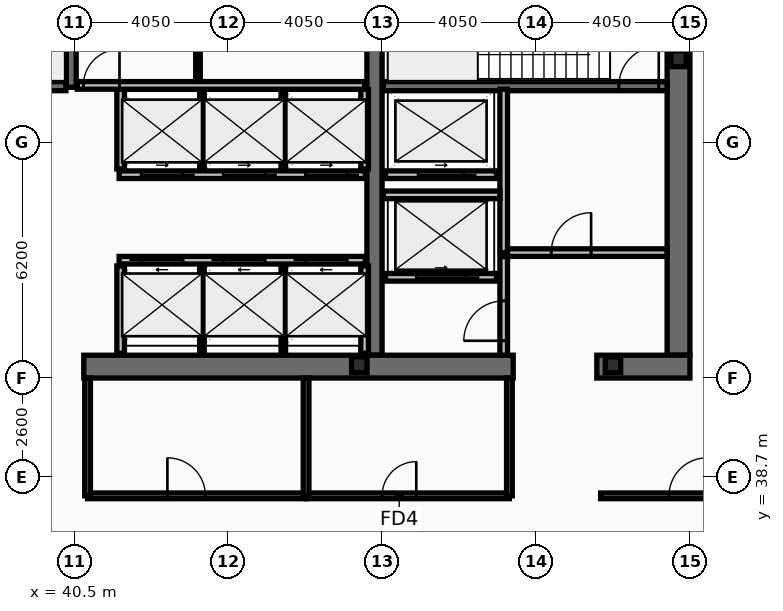
"""IFC4 building model, lengths in metres.
Left out: names, types, materials, properties, quantities, classifications, styles, units other than length and angle.
Written with IfcOpenShell. Run it as: python <this file> out.ifc"""

import sys

from ifc_helpers import new_model, si_unit, direction, frame, frame_2d, origin, origin_2d, place, context, subcontext, project, spatial, rectangle, i_section, extrude, element, fill, save


model = new_model("IFC4")
c1 = context("Model", 3, precision=1e-05, world=origin(), true_north=direction((0.0, 1.0)))
c2 = subcontext(c1, "Body", "Model", "MODEL_VIEW")
j1 = project(units=[si_unit("LENGTHUNIT", "METRE"), si_unit("PLANEANGLEUNIT", "RADIAN")], contexts=[c1])
p1 = place(None, origin())
s1 = spatial("IfcSite", under=j1, at=p1, CompositionType="ELEMENT")
p2 = place(p1, origin())
s2 = spatial("IfcBuilding", under=s1, at=p2, CompositionType="ELEMENT")
p3 = place(p2, frame((0.0, 0.0, 265.4)))
s3 = spatial("IfcBuildingStorey", under=s2, at=p3, CompositionType="ELEMENT", Elevation=265.4)
p4 = place(p3, frame((56.4, 53.1, 0.0), z_axis=(0.0, 0.0, 1.0), x_axis=(0.0, -1.0, 0.0)))
e1 = element("IfcWall", 1, at=p4, inside=s3, PredefinedType="SHEAR", context=c2, shape_type="SweptSolid", body=[
    extrude(rectangle(XDim=11.2, YDim=0.6, at=frame_2d((5.6, 0.0))), origin(), (0.0, 0.0, 1.0), 4.24),
])
p5 = place(p3, frame((48.4, 41.9, 0.0), z_axis=(0.0, 0.0, 1.0), x_axis=(0.0, 1.0, 0.0)))
e2 = element("IfcWall", 2, at=p5, inside=s3, PredefinedType="SHEAR", context=c2, shape_type="SweptSolid", body=[
    extrude(rectangle(XDim=11.2, YDim=0.4, at=frame_2d((5.6, 0.0))), origin(), (0.0, 0.0, 1.0), 4.24),
])
p6 = place(p3, frame((52.05, 41.6, 0.0), z_axis=(0.0, 0.0, 1.0), x_axis=(-1.0, 0.0, 0.0)))
e3 = element("IfcWall", 3, at=p6, inside=s3, PredefinedType="SHEAR", context=c2, shape_type="SweptSolid", body=[
    extrude(rectangle(XDim=11.3, YDim=0.6, at=frame_2d((5.65, 0.0))), origin(), (0.0, 0.0, 1.0), 4.24),
])
p7 = place(p3, frame((56.7, 41.6, 0.0), z_axis=(0.0, 0.0, 1.0), x_axis=(-1.0, 0.0, 0.0)))
e4 = element("IfcWall", 4, at=p7, inside=s3, PredefinedType="SHEAR", context=c2, shape_type="SweptSolid", body=[
    extrude(rectangle(XDim=2.45, YDim=0.6, at=frame_2d((1.225, 0.0))), origin(), (0.0, 0.0, 1.0), 4.24),
])
p8 = place(p3, frame((40.42, 48.95, 0.0), z_axis=(0.0, 0.0, 1.0), x_axis=(0.0, 1.0, 0.0)))
e5 = element("IfcWall", 5, at=p8, inside=s3, PredefinedType="SHEAR", context=c2, shape_type="SweptSolid", body=[
    extrude(rectangle(XDim=4.15, YDim=0.26, at=frame_2d((2.075, 0.0))), origin(), (0.0, 0.0, 1.0), 4.24),
])
p9 = place(p3, frame((48.63, 48.98, 0.0), z_axis=(0.0, 0.0, 1.0), x_axis=(1.0, 0.0, 0.0)))
e6 = element("IfcWall", 6, at=p9, inside=s3, PredefinedType="SHEAR", context=c2, shape_type="SweptSolid", body=[
    extrude(rectangle(XDim=7.47, YDim=0.24, at=frame_2d((3.735, 0.0))), origin(), (0.0, 0.0, 1.0), 4.24),
])
p10 = place(p9, frame((6.2, 0.0, 0.0)))
e7 = element("IfcOpeningElement", 7, at=p10, cuts=e6, PredefinedType="OPENING", context=c2, shape_type="SweptSolid", body=[
    extrude(rectangle(XDim=1.05, YDim=2.15, at=frame_2d((0.525, 1.075))), frame((0.0, 0.13, 0.0), z_axis=(0.0, -1.0, 0.0), x_axis=(1.0, 0.0, 0.0)), (0.0, 0.0, 1.0), 0.26),
])
p11 = place(p3, frame((32.72, 48.98, 0.0), z_axis=(0.0, 0.0, 1.0), x_axis=(1.0, 0.0, 0.0)))
e8 = element("IfcWall", 8, at=p11, inside=s3, PredefinedType="SHEAR", context=c2, shape_type="SweptSolid", body=[
    extrude(rectangle(XDim=7.56, YDim=0.24, at=frame_2d((3.78, 0.0))), origin(), (0.0, 0.0, 1.0), 4.24),
])
p12 = place(p11, frame((0.22, 0.0, 0.0)))
e9 = element("IfcOpeningElement", 9, at=p12, cuts=e8, PredefinedType="OPENING", context=c2, shape_type="SweptSolid", body=[
    extrude(rectangle(XDim=1.05, YDim=2.15, at=frame_2d((0.525, 1.075))), frame((0.0, 0.13, 0.0), z_axis=(0.0, -1.0, 0.0), x_axis=(1.0, 0.0, 0.0)), (0.0, 0.0, 1.0), 0.26),
])
for number, where, z_axis, x_axis in (
    (10, (56.4, 49.7, 0.0), (0.0, 0.0, 1.0), (1.0, 0.0, 0.0)),
    (11, (48.0, 41.65, 0.0), (0.0, 0.0, 1.0), (1.0, 0.0, 0.0)),
    (12, (54.675, 41.65, 0.0), (0.0, 0.0, 1.0), (1.0, 0.0, 0.0)),
):
    element("IfcColumn", number, at=place(p3, frame(where, z_axis=z_axis, x_axis=x_axis)), inside=s3, PredefinedType="COLUMN", context=c2, shape_type="SweptSolid", body=[
        extrude(i_section(OverallWidth=0.406, OverallDepth=0.416, WebThickness=0.03, FlangeThickness=0.048, at=origin_2d()), origin(), (0.0, 0.0, 1.0), 4.4),
    ])
p13 = place(p3, frame((41.68, 44.4, 0.0), z_axis=(0.0, 0.0, 1.0), x_axis=(1.0, 0.0, 0.0)))
e13 = element("IfcWall", 13, at=p13, inside=s3, PredefinedType="PARTITIONING", context=c2, shape_type="SweptSolid", body=[
    extrude(rectangle(XDim=6.48, YDim=0.2, at=frame_2d((3.24, 0.0))), origin(), (0.0, 0.0, 1.0), 4.24),
])
p14 = place(p13, frame((0.58, 0.0, 0.0)))
e14 = element("IfcOpeningElement", 14, at=p14, cuts=e13, PredefinedType="OPENING", context=c2, shape_type="SweptSolid", body=[
    extrude(rectangle(XDim=1.1, YDim=2.18, at=frame_2d((0.55, 1.09))), frame((0.0, 0.11, 0.0), z_axis=(0.0, -1.0, 0.0), x_axis=(1.0, 0.0, 0.0)), (0.0, 0.0, 1.0), 0.22),
])
p15 = place(p13, frame((2.74, 0.0, 0.0)))
e15 = element("IfcOpeningElement", 15, at=p15, cuts=e13, PredefinedType="OPENING", context=c2, shape_type="SweptSolid", body=[
    extrude(rectangle(XDim=1.1, YDim=2.18, at=frame_2d((0.55, 1.09))), frame((0.0, 0.11, 0.0), z_axis=(0.0, -1.0, 0.0), x_axis=(1.0, 0.0, 0.0)), (0.0, 0.0, 1.0), 0.22),
])
p16 = place(p13, frame((4.9, 0.0, 0.0)))
e16 = element("IfcOpeningElement", 16, at=p16, cuts=e13, PredefinedType="OPENING", context=c2, shape_type="SweptSolid", body=[
    extrude(rectangle(XDim=1.1, YDim=2.18, at=frame_2d((0.55, 1.09))), frame((0.0, 0.11, 0.0), z_axis=(0.0, -1.0, 0.0), x_axis=(1.0, 0.0, 0.0)), (0.0, 0.0, 1.0), 0.22),
])
p17 = place(p3, frame((51.61, 43.95, 0.0), z_axis=(0.0, 0.0, 1.0), x_axis=(-1.0, 0.0, 0.0)))
e17 = element("IfcWall", 17, at=p17, inside=s3, PredefinedType="PARTITIONING", context=c2, shape_type="SweptSolid", body=[
    extrude(rectangle(XDim=2.92, YDim=0.2, at=frame_2d((1.46, 0.0))), origin(), (0.0, 0.0, 1.0), 4.24),
])
p18 = place(p17, frame((0.81, 0.0, 0.0)))
e18 = element("IfcOpeningElement", 18, at=p18, cuts=e17, PredefinedType="OPENING", context=c2, shape_type="SweptSolid", body=[
    extrude(rectangle(XDim=1.3, YDim=2.18, at=frame_2d((0.65, 1.09))), frame((0.0, 0.11, 0.0), z_axis=(0.0, -1.0, 0.0), x_axis=(1.0, 0.0, 0.0)), (0.0, 0.0, 1.0), 0.22),
])
p19 = place(p3, frame((51.61, 46.65, 0.0), z_axis=(0.0, 0.0, 1.0), x_axis=(-1.0, 0.0, 0.0)))
e19 = element("IfcWall", 19, at=p19, inside=s3, PredefinedType="PARTITIONING", context=c2, shape_type="SweptSolid", body=[
    extrude(rectangle(XDim=2.92, YDim=0.2, at=frame_2d((1.46, 0.0))), origin(), (0.0, 0.0, 1.0), 4.24),
])
p20 = place(p19, frame((0.86, 0.0, 0.0)))
e20 = element("IfcOpeningElement", 20, at=p20, cuts=e19, PredefinedType="OPENING", context=c2, shape_type="SweptSolid", body=[
    extrude(rectangle(XDim=1.2, YDim=2.18, at=frame_2d((0.6, 1.09))), frame((0.0, 0.11, 0.0), z_axis=(0.0, -1.0, 0.0), x_axis=(1.0, 0.0, 0.0)), (0.0, 0.0, 1.0), 0.22),
])
p21 = place(p3, frame((48.16, 46.65, 0.0), z_axis=(0.0, 0.0, 1.0), x_axis=(-1.0, 0.0, 0.0)))
e21 = element("IfcWall", 21, at=p21, inside=s3, PredefinedType="PARTITIONING", context=c2, shape_type="SweptSolid", body=[
    extrude(rectangle(XDim=6.48, YDim=0.2, at=frame_2d((3.24, 0.0))), origin(), (0.0, 0.0, 1.0), 4.24),
])
p22 = place(p21, frame((4.8, 0.0, 0.0)))
e22 = element("IfcOpeningElement", 22, at=p22, cuts=e21, PredefinedType="OPENING", context=c2, shape_type="SweptSolid", body=[
    extrude(rectangle(XDim=1.1, YDim=2.18, at=frame_2d((0.55, 1.09))), frame((0.0, 0.11, 0.0), z_axis=(0.0, -1.0, 0.0), x_axis=(1.0, 0.0, 0.0)), (0.0, 0.0, 1.0), 0.22),
])
p23 = place(p21, frame((2.64, 0.0, 0.0)))
e23 = element("IfcOpeningElement", 23, at=p23, cuts=e21, PredefinedType="OPENING", context=c2, shape_type="SweptSolid", body=[
    extrude(rectangle(XDim=1.1, YDim=2.18, at=frame_2d((0.55, 1.09))), frame((0.0, 0.11, 0.0), z_axis=(0.0, -1.0, 0.0), x_axis=(1.0, 0.0, 0.0)), (0.0, 0.0, 1.0), 0.22),
])
p24 = place(p21, frame((0.48, 0.0, 0.0)))
e24 = element("IfcOpeningElement", 24, at=p24, cuts=e21, PredefinedType="OPENING", context=c2, shape_type="SweptSolid", body=[
    extrude(rectangle(XDim=1.1, YDim=2.18, at=frame_2d((0.55, 1.09))), frame((0.0, 0.11, 0.0), z_axis=(0.0, -1.0, 0.0), x_axis=(1.0, 0.0, 0.0)), (0.0, 0.0, 1.0), 0.22),
])
p25 = place(p3, frame((51.8, 44.6, 0.0), z_axis=(0.0, 0.0, 1.0), x_axis=(0.0, 1.0, 0.0)))
e25 = element("IfcWall", 25, at=p25, inside=s3, PredefinedType="PARTITIONING", context=c2, shape_type="SweptSolid", body=[
    extrude(rectangle(XDim=4.3, YDim=0.2, at=frame_2d((2.15, 0.0))), origin(), (0.0, 0.0, 1.0), 4.24),
])
p26 = place(p3, frame((51.9, 44.6, 0.0), z_axis=(0.0, 0.0, 1.0), x_axis=(1.0, 0.0, 0.0)))
e26 = element("IfcWall", 26, at=p26, inside=s3, PredefinedType="PARTITIONING", context=c2, shape_type="SweptSolid", body=[
    extrude(rectangle(XDim=4.2, YDim=0.2, at=frame_2d((2.1, 0.0))), origin(), (0.0, 0.0, 1.0), 4.24),
])
p27 = place(p26, frame((1.15, 0.0, 0.0)))
e27 = element("IfcOpeningElement", 27, at=p27, cuts=e26, PredefinedType="OPENING", context=c2, shape_type="SweptSolid", body=[
    extrude(rectangle(XDim=1.05, YDim=2.15, at=frame_2d((0.525, 1.075))), frame((0.0, 0.11, 0.0), z_axis=(0.0, -1.0, 0.0), x_axis=(1.0, 0.0, 0.0)), (0.0, 0.0, 1.0), 0.22),
])
p28 = place(p3, frame((48.63, 46.12, 0.0), z_axis=(0.0, 0.0, 1.0), x_axis=(1.0, 0.0, 0.0)))
e28 = element("IfcWall", 28, at=p28, inside=s3, PredefinedType="PARTITIONING", context=c2, shape_type="SweptSolid", body=[
    extrude(rectangle(XDim=3.07, YDim=0.2, at=frame_2d((1.535, 0.0))), origin(), (0.0, 0.0, 1.0), 4.24),
])
p29 = place(p3, frame((51.8, 41.9, 0.0), z_axis=(0.0, 0.0, 1.0), x_axis=(0.0, 1.0, 0.0)))
e29 = element("IfcWall", 29, at=p29, inside=s3, PredefinedType="PARTITIONING", context=c2, shape_type="SweptSolid", body=[
    extrude(rectangle(XDim=2.595, YDim=0.2, at=frame_2d((1.298, 0.0))), origin(), (0.0, 0.0, 1.0), 4.24),
])
p30 = place(p29, frame((0.38, 0.0, 0.0)))
e30 = element("IfcOpeningElement", 30, at=p30, cuts=e29, PredefinedType="OPENING", context=c2, shape_type="SweptSolid", body=[
    extrude(rectangle(XDim=1.05, YDim=2.15, at=frame_2d((0.525, 1.075))), frame((0.0, 0.11, 0.0), z_axis=(0.0, -1.0, 0.0), x_axis=(1.0, 0.0, 0.0)), (0.0, 0.0, 1.0), 0.22),
])
for number, where, z_axis, x_axis in (
    (31, (41.72, 46.8, 0.0), (0.0, 0.0, 1.0), (0.0, 1.0, 0.0)),
    (32, (48.14, 46.8, 0.0), (0.0, 0.0, 1.0), (0.0, 1.0, 0.0)),
):
    element("IfcWall", number, at=place(p3, frame(where, z_axis=z_axis, x_axis=x_axis)), inside=s3, PredefinedType="PARTITIONING", context=c2, shape_type="SweptSolid", body=[
        extrude(rectangle(XDim=2.095, YDim=0.2, at=frame_2d((1.047, 0.0))), origin(), (0.0, 0.0, 1.0), 4.24),
    ])
for number, where, z_axis, x_axis in (
    (33, (43.86, 46.8, 0.0), (0.0, 0.0, 1.0), (0.0, 1.0, 0.0)),
    (34, (46.0, 46.8, 0.0), (0.0, 0.0, 1.0), (0.0, 1.0, 0.0)),
):
    element("IfcWall", number, at=place(p3, frame(where, z_axis=z_axis, x_axis=x_axis)), inside=s3, PredefinedType="PARTITIONING", context=c2, shape_type="SweptSolid", body=[
        extrude(rectangle(XDim=2.095, YDim=0.12, at=frame_2d((1.047, 0.0))), origin(), (0.0, 0.0, 1.0), 4.24),
    ])
for number, where, z_axis, x_axis in (
    (35, (41.72, 41.95, 0.0), (0.0, 0.0, 1.0), (0.0, 1.0, 0.0)),
    (36, (48.14, 41.95, 0.0), (0.0, 0.0, 1.0), (0.0, 1.0, 0.0)),
):
    element("IfcWall", number, at=place(p3, frame(where, z_axis=z_axis, x_axis=x_axis)), inside=s3, PredefinedType="PARTITIONING", context=c2, shape_type="SweptSolid", body=[
        extrude(rectangle(XDim=2.3, YDim=0.2, at=frame_2d((1.15, 0.0))), origin(), (0.0, 0.0, 1.0), 4.24),
    ])
for number, where, z_axis, x_axis in (
    (37, (43.86, 41.95, 0.0), (0.0, 0.0, 1.0), (0.0, 1.0, 0.0)),
    (38, (46.0, 41.95, 0.0), (0.0, 0.0, 1.0), (0.0, 1.0, 0.0)),
):
    element("IfcWall", number, at=place(p3, frame(where, z_axis=z_axis, x_axis=x_axis)), inside=s3, PredefinedType="PARTITIONING", context=c2, shape_type="SweptSolid", body=[
        extrude(rectangle(XDim=2.3, YDim=0.12, at=frame_2d((1.15, 0.0))), origin(), (0.0, 0.0, 1.0), 4.24),
    ])
p31 = place(p3, frame((40.58, 49.0, 0.0), z_axis=(0.0, 0.0, 1.0), x_axis=(1.0, 0.0, 0.0)))
e39 = element("IfcWall", 39, at=p31, inside=s3, PredefinedType="PARTITIONING", context=c2, shape_type="SweptSolid", body=[
    extrude(rectangle(XDim=7.56, YDim=0.2, at=frame_2d((3.78, 0.0))), origin(), (0.0, 0.0, 1.0), 4.24),
])
p32 = place(p31, frame((0.16, 0.0, 0.0)))
e40 = element("IfcOpeningElement", 40, at=p32, cuts=e39, PredefinedType="OPENING", context=c2, shape_type="SweptSolid", body=[
    extrude(rectangle(XDim=0.95, YDim=2.1, at=frame_2d((0.475, 1.05))), frame((0.0, 0.11, 0.0), z_axis=(0.0, -1.0, 0.0), x_axis=(1.0, 0.0, 0.0)), (0.0, 0.0, 1.0), 0.22),
])
p33 = place(p3, frame((43.755, 49.105, 0.0), z_axis=(0.0, 0.0, 1.0), x_axis=(0.0, 1.0, 0.0)))
e41 = element("IfcWall", 41, at=p33, inside=s3, PredefinedType="PARTITIONING", context=c2, shape_type="SweptSolid", body=[
    extrude(rectangle(XDim=3.69, YDim=0.12, at=frame_2d((1.845, 0.0))), origin(), (0.0, 0.0, 1.0), 4.24),
])
p34 = place(p33, frame((1.05, 0.0, 0.0)))
e42 = element("IfcOpeningElement", 42, at=p34, cuts=e41, PredefinedType="OPENING", context=c2, shape_type="SweptSolid", body=[
    extrude(rectangle(XDim=0.9, YDim=2.05, at=frame_2d((0.45, 1.025))), frame((0.0, 0.07, 0.0), z_axis=(0.0, -1.0, 0.0), x_axis=(1.0, 0.0, 0.0)), (0.0, 0.0, 1.0), 0.14),
])
p35 = place(p3, frame((40.85, 38.2, 0.0), z_axis=(0.0, 0.0, 1.0), x_axis=(1.0, 0.0, 0.0)))
e43 = element("IfcWall", 43, at=p35, inside=s3, PredefinedType="PARTITIONING", context=c2, shape_type="SweptSolid", body=[
    extrude(rectangle(XDim=5.75, YDim=0.15, at=frame_2d((2.875, 0.0))), origin(), (0.0, 0.0, 1.0), 3.58),
])
p36 = place(p35, frame((2.1, 0.0, 0.0)))
e44 = element("IfcOpeningElement", 44, at=p36, cuts=e43, PredefinedType="OPENING", context=c2, shape_type="SweptSolid", body=[
    extrude(rectangle(XDim=1.0, YDim=2.05, at=frame_2d((0.5, 1.025))), frame((0.0, 0.085, 0.0), z_axis=(0.0, -1.0, 0.0), x_axis=(1.0, 0.0, 0.0)), (0.0, 0.0, 1.0), 0.17),
])
p37 = place(p3, frame((46.6, 38.2, 0.0), z_axis=(0.0, 0.0, 1.0), x_axis=(1.0, 0.0, 0.0)))
e45 = element("IfcWall", 45, at=p37, inside=s3, PredefinedType="PARTITIONING", context=c2, shape_type="SweptSolid", body=[
    extrude(rectangle(XDim=5.35, YDim=0.15, at=frame_2d((2.675, 0.0))), origin(), (0.0, 0.0, 1.0), 3.58),
])
p38 = place(p37, frame((2.0, 0.0, 0.0)))
e46 = element("IfcOpeningElement", 46, at=p38, cuts=e45, PredefinedType="OPENING", context=c2, shape_type="SweptSolid", body=[
    extrude(rectangle(XDim=0.9, YDim=2.05, at=frame_2d((0.45, 1.025))), frame((0.0, 0.085, 0.0), z_axis=(0.0, -1.0, 0.0), x_axis=(1.0, 0.0, 0.0)), (0.0, 0.0, 1.0), 0.17),
])
for number, where, z_axis, x_axis in (
    (47, (40.85, 38.2, 0.0), (0.0, 0.0, 1.0), (0.0, 1.0, 0.0)),
    (48, (46.6, 38.2, 0.0), (0.0, 0.0, 1.0), (0.0, 1.0, 0.0)),
    (49, (51.95, 38.2, 0.0), (0.0, 0.0, 1.0), (0.0, 1.0, 0.0)),
):
    element("IfcWall", number, at=place(p3, frame(where, z_axis=z_axis, x_axis=x_axis)), inside=s3, PredefinedType="PARTITIONING", context=c2, shape_type="SweptSolid", body=[
        extrude(rectangle(XDim=3.1, YDim=0.15, at=frame_2d((1.55, 0.0))), origin(), (0.0, 0.0, 1.0), 4.24),
    ])
p39 = place(p3, frame((54.35, 38.2, 0.0), z_axis=(0.0, 0.0, 1.0), x_axis=(1.0, 0.0, 0.0)))
e50 = element("IfcWall", 50, at=p39, inside=s3, PredefinedType="PARTITIONING", context=c2, shape_type="SweptSolid", body=[
    extrude(rectangle(XDim=8.52, YDim=0.15, at=frame_2d((4.26, 0.0))), origin(), (0.0, 0.0, 1.0), 3.58),
])
p40 = place(p39, frame((1.8, 0.0, 0.0)))
e51 = element("IfcOpeningElement", 51, at=p40, cuts=e50, PredefinedType="OPENING", context=c2, shape_type="SweptSolid", body=[
    extrude(rectangle(XDim=1.0, YDim=2.05, at=frame_2d((0.5, 1.025))), frame((0.0, 0.085, 0.0), z_axis=(0.0, -1.0, 0.0), x_axis=(1.0, 0.0, 0.0)), (0.0, 0.0, 1.0), 0.17),
])
p41 = place(p10, origin())
e52 = element("IfcDoor", 52, at=p41, inside=s3, OperationType="SINGLE_SWING_RIGHT", PredefinedType="DOOR", context=c2, shape_type="SweptSolid", body=[
    extrude(rectangle(XDim=1.05, YDim=2.15, at=frame_2d((0.525, 1.075))), frame((0.0, 0.025, 0.0), z_axis=(0.0, -1.0, 0.0), x_axis=(1.0, 0.0, 0.0)), (0.0, 0.0, 1.0), 0.05),
])
fill(e7, e52)
p42 = place(p14, origin())
e53 = element("IfcDoor", 53, at=p42, inside=s3, OperationType="SLIDING_TO_LEFT", PredefinedType="DOOR", context=c2, shape_type="SweptSolid", body=[
    extrude(rectangle(XDim=1.1, YDim=2.18, at=frame_2d((0.55, 1.09))), frame((0.0, 0.025, 0.0), z_axis=(0.0, -1.0, 0.0), x_axis=(1.0, 0.0, 0.0)), (0.0, 0.0, 1.0), 0.05),
])
fill(e14, e53)
p43 = place(p15, origin())
e54 = element("IfcDoor", 54, at=p43, inside=s3, OperationType="SLIDING_TO_LEFT", PredefinedType="DOOR", context=c2, shape_type="SweptSolid", body=[
    extrude(rectangle(XDim=1.1, YDim=2.18, at=frame_2d((0.55, 1.09))), frame((0.0, 0.025, 0.0), z_axis=(0.0, -1.0, 0.0), x_axis=(1.0, 0.0, 0.0)), (0.0, 0.0, 1.0), 0.05),
])
fill(e15, e54)
p44 = place(p16, origin())
e55 = element("IfcDoor", 55, at=p44, inside=s3, OperationType="SLIDING_TO_LEFT", PredefinedType="DOOR", context=c2, shape_type="SweptSolid", body=[
    extrude(rectangle(XDim=1.1, YDim=2.18, at=frame_2d((0.55, 1.09))), frame((0.0, 0.025, 0.0), z_axis=(0.0, -1.0, 0.0), x_axis=(1.0, 0.0, 0.0)), (0.0, 0.0, 1.0), 0.05),
])
fill(e16, e55)
p45 = place(p18, origin())
e56 = element("IfcDoor", 56, at=p45, inside=s3, OperationType="SLIDING_TO_LEFT", PredefinedType="DOOR", context=c2, shape_type="SweptSolid", body=[
    extrude(rectangle(XDim=1.3, YDim=2.18, at=frame_2d((0.65, 1.09))), frame((0.0, 0.025, 0.0), z_axis=(0.0, -1.0, 0.0), x_axis=(1.0, 0.0, 0.0)), (0.0, 0.0, 1.0), 0.05),
])
fill(e18, e56)
p46 = place(p20, origin())
e57 = element("IfcDoor", 57, at=p46, inside=s3, OperationType="SLIDING_TO_LEFT", PredefinedType="DOOR", context=c2, shape_type="SweptSolid", body=[
    extrude(rectangle(XDim=1.2, YDim=2.18, at=frame_2d((0.6, 1.09))), frame((0.0, 0.025, 0.0), z_axis=(0.0, -1.0, 0.0), x_axis=(1.0, 0.0, 0.0)), (0.0, 0.0, 1.0), 0.05),
])
fill(e20, e57)
p47 = place(p22, origin())
e58 = element("IfcDoor", 58, at=p47, inside=s3, OperationType="SLIDING_TO_LEFT", PredefinedType="DOOR", context=c2, shape_type="SweptSolid", body=[
    extrude(rectangle(XDim=1.1, YDim=2.18, at=frame_2d((0.55, 1.09))), frame((0.0, 0.025, 0.0), z_axis=(0.0, -1.0, 0.0), x_axis=(1.0, 0.0, 0.0)), (0.0, 0.0, 1.0), 0.05),
])
fill(e22, e58)
p48 = place(p23, origin())
e59 = element("IfcDoor", 59, at=p48, inside=s3, OperationType="SLIDING_TO_LEFT", PredefinedType="DOOR", context=c2, shape_type="SweptSolid", body=[
    extrude(rectangle(XDim=1.1, YDim=2.18, at=frame_2d((0.55, 1.09))), frame((0.0, 0.025, 0.0), z_axis=(0.0, -1.0, 0.0), x_axis=(1.0, 0.0, 0.0)), (0.0, 0.0, 1.0), 0.05),
])
fill(e23, e59)
p49 = place(p24, origin())
e60 = element("IfcDoor", 60, at=p49, inside=s3, OperationType="SLIDING_TO_LEFT", PredefinedType="DOOR", context=c2, shape_type="SweptSolid", body=[
    extrude(rectangle(XDim=1.1, YDim=2.18, at=frame_2d((0.55, 1.09))), frame((0.0, 0.025, 0.0), z_axis=(0.0, -1.0, 0.0), x_axis=(1.0, 0.0, 0.0)), (0.0, 0.0, 1.0), 0.05),
])
fill(e24, e60)
p50 = place(p27, origin())
e61 = element("IfcDoor", 61, at=p50, inside=s3, OperationType="SINGLE_SWING_RIGHT", PredefinedType="DOOR", context=c2, shape_type="SweptSolid", body=[
    extrude(rectangle(XDim=1.05, YDim=2.15, at=frame_2d((0.525, 1.075))), frame((0.0, 0.025, 0.0), z_axis=(0.0, -1.0, 0.0), x_axis=(1.0, 0.0, 0.0)), (0.0, 0.0, 1.0), 0.05),
])
fill(e27, e61)
p51 = place(p30, origin())
e62 = element("IfcDoor", 62, at=p51, inside=s3, OperationType="SINGLE_SWING_LEFT", PredefinedType="DOOR", context=c2, shape_type="SweptSolid", body=[
    extrude(rectangle(XDim=1.05, YDim=2.15, at=frame_2d((0.525, 1.075))), frame((0.0, 0.025, 0.0), z_axis=(0.0, -1.0, 0.0), x_axis=(1.0, 0.0, 0.0)), (0.0, 0.0, 1.0), 0.05),
])
fill(e30, e62)
p52 = place(p32, origin())
e63 = element("IfcDoor", 63, at=p52, inside=s3, OperationType="SINGLE_SWING_RIGHT", PredefinedType="DOOR", context=c2, shape_type="SweptSolid", body=[
    extrude(rectangle(XDim=0.95, YDim=2.1, at=frame_2d((0.475, 1.05))), frame((0.0, 0.025, 0.0), z_axis=(0.0, -1.0, 0.0), x_axis=(1.0, 0.0, 0.0)), (0.0, 0.0, 1.0), 0.05),
])
fill(e40, e63)
p53 = place(p36, origin())
e64 = element("IfcDoor", 64, at=p53, inside=s3, OperationType="SINGLE_SWING_LEFT", PredefinedType="DOOR", context=c2, shape_type="SweptSolid", body=[
    extrude(rectangle(XDim=1.0, YDim=2.05, at=frame_2d((0.5, 1.025))), frame((0.0, 0.025, 0.0), z_axis=(0.0, -1.0, 0.0), x_axis=(1.0, 0.0, 0.0)), (0.0, 0.0, 1.0), 0.05),
])
fill(e44, e64)
p54 = place(p38, origin())
e65 = element("IfcDoor", 65, at=p54, inside=s3, OperationType="SINGLE_SWING_RIGHT", PredefinedType="DOOR", context=c2, shape_type="SweptSolid", body=[
    extrude(rectangle(XDim=0.9, YDim=2.05, at=frame_2d((0.45, 1.025))), frame((0.0, 0.025, 0.0), z_axis=(0.0, -1.0, 0.0), x_axis=(1.0, 0.0, 0.0)), (0.0, 0.0, 1.0), 0.05),
])
fill(e46, e65)
p55 = place(p40, origin())
e66 = element("IfcDoor", 66, at=p55, inside=s3, OperationType="SINGLE_SWING_RIGHT", PredefinedType="DOOR", context=c2, shape_type="SweptSolid", body=[
    extrude(rectangle(XDim=1.0, YDim=2.05, at=frame_2d((0.5, 1.025))), frame((0.0, 0.025, 0.0), z_axis=(0.0, -1.0, 0.0), x_axis=(1.0, 0.0, 0.0)), (0.0, 0.0, 1.0), 0.05),
])
fill(e51, e66)
save(model, sys.argv[1])
